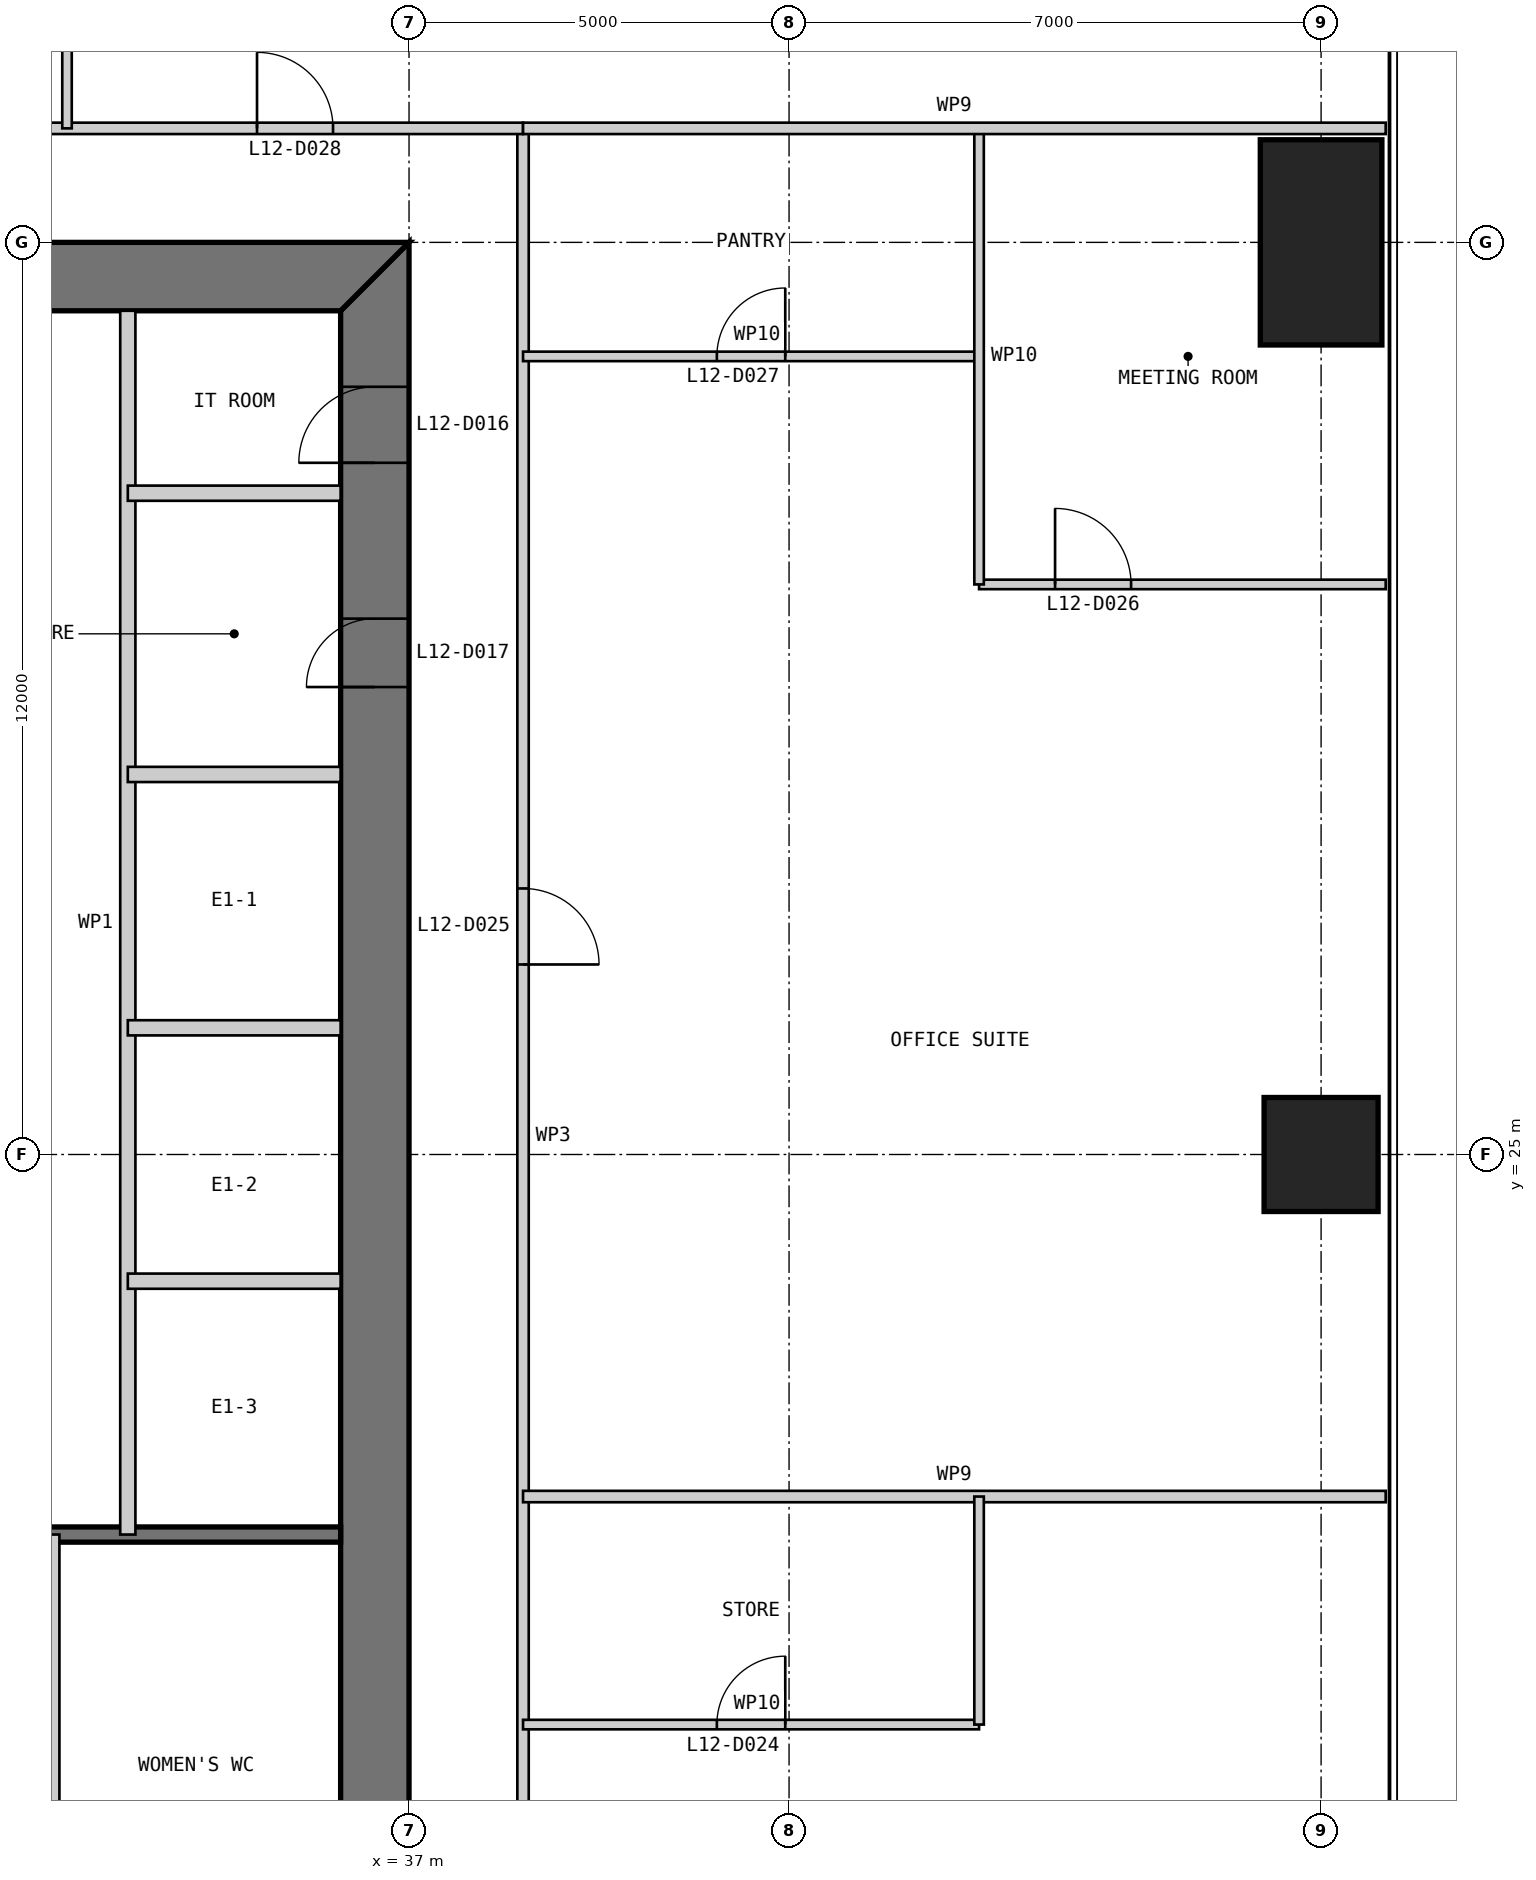
"""IFC4 building model, lengths in metres.
Left out: names, types, materials, properties, quantities, classifications, styles, units other than length and angle.
Written with IfcOpenShell. Run it as: python <this file> out.ifc"""

import sys

from ifc_helpers import new_model, si_unit, direction, frame, frame_2d, origin, origin_2d, place, context, subcontext, project, spatial, polyline, rectangle, outline, extrude, element, fill, save


model = new_model("IFC4")
c1 = context("Model", 3, precision=1e-05, world=origin(), true_north=direction((0.0, 1.0)))
c2 = subcontext(c1, "Body", "Model", "MODEL_VIEW")
j1 = project(units=[si_unit("LENGTHUNIT", "METRE"), si_unit("PLANEANGLEUNIT", "RADIAN")], contexts=[c1])
p1 = place(None, origin())
s1 = spatial("IfcSite", under=j1, at=p1, CompositionType="ELEMENT")
p2 = place(p1, origin())
s2 = spatial("IfcBuilding", under=s1, at=p2, CompositionType="ELEMENT")
p3 = place(p2, frame((0.0, 0.0, 55.0)))
s3 = spatial("IfcBuildingStorey", under=s2, at=p3, CompositionType="ELEMENT", Elevation=55.0)
p4 = place(p3, frame((49.0, 25.0, 0.0), z_axis=(0.0, 0.0, 1.0), x_axis=(1.0, 0.0, 0.0)))
e1 = element("IfcColumn", 1, at=p4, inside=s3, PredefinedType="COLUMN", context=c2, shape_type="SweptSolid", body=[
    extrude(rectangle(XDim=1.5, YDim=1.5, at=origin_2d()), origin(), (0.0, 0.0, 1.0), 4.0),
])
p5 = place(p3, frame((49.0, 37.0, 0.0), z_axis=(0.0, 0.0, 1.0), x_axis=(1.0, 0.0, 0.0)))
e2 = element("IfcColumn", 2, at=p5, inside=s3, PredefinedType="COLUMN", context=c2, shape_type="SweptSolid", body=[
    extrude(rectangle(XDim=1.6, YDim=2.7, at=origin_2d()), origin(), (0.0, 0.0, 1.0), 4.0),
])
p6 = place(p3, frame((36.55, 13.9, 0.0), z_axis=(0.0, 0.0, 1.0), x_axis=(0.0, 1.0, 0.0)))
e3 = element("IfcWall", 3, at=p6, inside=s3, PredefinedType="SHEAR", context=c2, shape_type="SweptSolid", body=[
    extrude(outline(polyline([(-0.9, -0.45), (23.1, -0.45), (22.2, 0.45), (0.0, 0.45), (-0.9, -0.45)])), origin(), (0.0, 0.0, 1.0), 4.0),
])
p7 = place(p6, frame((20.2, 0.0, 0.0)))
e4 = element("IfcOpeningElement", 4, at=p7, cuts=e3, PredefinedType="OPENING", context=c2, shape_type="SweptSolid", body=[
    extrude(rectangle(XDim=1.0, YDim=2.2, at=frame_2d((0.5, 1.1))), frame((0.0, 0.46, 0.0), z_axis=(0.0, -1.0, 0.0), x_axis=(1.0, 0.0, 0.0)), (0.0, 0.0, 1.0), 0.92),
])
p8 = place(p6, frame((17.25, 0.0, 0.0)))
e5 = element("IfcOpeningElement", 5, at=p8, cuts=e3, PredefinedType="OPENING", context=c2, shape_type="SweptSolid", body=[
    extrude(rectangle(XDim=0.9, YDim=2.2, at=frame_2d((0.45, 1.1))), frame((0.0, 0.46, 0.0), z_axis=(0.0, -1.0, 0.0), x_axis=(1.0, 0.0, 0.0)), (0.0, 0.0, 1.0), 0.92),
])
p9 = place(p3, frame((37.0, 36.55, 0.0), z_axis=(0.0, 0.0, 1.0), x_axis=(-1.0, 0.0, 0.0)))
e6 = element("IfcWall", 6, at=p9, inside=s3, PredefinedType="SHEAR", context=c2, shape_type="SweptSolid", body=[
    extrude(outline(polyline([(0.0, -0.45), (24.0, -0.45), (23.1, 0.45), (0.9, 0.45), (0.0, -0.45)])), origin(), (0.0, 0.0, 1.0), 4.0),
])
p10 = place(p9, frame((4.9, 0.0, 0.0)))
e7 = element("IfcOpeningElement", 7, at=p10, cuts=e6, PredefinedType="OPENING", context=c2, shape_type="SweptSolid", body=[
    extrude(rectangle(XDim=1.0, YDim=2.2, at=frame_2d((0.5, 1.1))), frame((0.0, 0.46, 0.0), z_axis=(0.0, -1.0, 0.0), x_axis=(1.0, 0.0, 0.0)), (0.0, 0.0, 1.0), 0.92),
])
p11 = place(p9, frame((8.9, 0.0, 0.0)))
e8 = element("IfcOpeningElement", 8, at=p11, cuts=e6, PredefinedType="OPENING", context=c2, shape_type="SweptSolid", body=[
    extrude(rectangle(XDim=1.1, YDim=2.2, at=frame_2d((0.55, 1.1))), frame((0.0, 0.46, 0.0), z_axis=(0.0, -1.0, 0.0), x_axis=(1.0, 0.0, 0.0)), (0.0, 0.0, 1.0), 0.92),
])
p12 = place(p9, frame((15.05, 0.0, 0.0)))
e9 = element("IfcOpeningElement", 9, at=p12, cuts=e6, PredefinedType="OPENING", context=c2, shape_type="SweptSolid", body=[
    extrude(rectangle(XDim=0.9, YDim=2.2, at=frame_2d((0.45, 1.1))), frame((0.0, 0.46, 0.0), z_axis=(0.0, -1.0, 0.0), x_axis=(1.0, 0.0, 0.0)), (0.0, 0.0, 1.0), 0.92),
])
p13 = place(p9, frame((17.9, 0.0, 0.0)))
e10 = element("IfcOpeningElement", 10, at=p13, cuts=e6, PredefinedType="OPENING", context=c2, shape_type="SweptSolid", body=[
    extrude(rectangle(XDim=1.0, YDim=2.2, at=frame_2d((0.5, 1.1))), frame((0.0, 0.46, 0.0), z_axis=(0.0, -1.0, 0.0), x_axis=(1.0, 0.0, 0.0)), (0.0, 0.0, 1.0), 0.92),
])
p14 = place(p9, frame((21.4, 0.0, 0.0)))
e11 = element("IfcOpeningElement", 11, at=p14, cuts=e6, PredefinedType="OPENING", context=c2, shape_type="SweptSolid", body=[
    extrude(rectangle(XDim=1.0, YDim=2.2, at=frame_2d((0.5, 1.1))), frame((0.0, 0.46, 0.0), z_axis=(0.0, -1.0, 0.0), x_axis=(1.0, 0.0, 0.0)), (0.0, 0.0, 1.0), 0.92),
])
p15 = place(p3, frame((20.3, 20.0, 0.0), z_axis=(0.0, 0.0, 1.0), x_axis=(1.0, 0.0, 0.0)))
e12 = element("IfcWall", 12, at=p15, inside=s3, PredefinedType="SOLIDWALL", context=c2, shape_type="SweptSolid", body=[
    extrude(rectangle(XDim=15.8, YDim=0.2, at=frame_2d((7.9, 0.0))), origin(), (0.0, 0.0, 1.0), 3.8),
])
p16 = place(p3, frame((32.3, 13.9, 0.0), z_axis=(0.0, 0.0, 1.0), x_axis=(0.0, 1.0, 0.0)))
e13 = element("IfcWall", 13, at=p16, inside=s3, PredefinedType="PARTITIONING", context=c2, shape_type="SweptSolid", body=[
    extrude(rectangle(XDim=6.1, YDim=0.2, at=frame_2d((3.05, 0.0))), origin(), (0.0, 0.0, 1.0), 3.8),
])
p17 = place(p3, frame((33.3, 36.1, 0.0), z_axis=(0.0, 0.0, 1.0), x_axis=(0.0, -1.0, 0.0)))
e14 = element("IfcWall", 14, at=p17, inside=s3, PredefinedType="PARTITIONING", context=c2, shape_type="SweptSolid", body=[
    extrude(rectangle(XDim=16.1, YDim=0.2, at=frame_2d((8.05, 0.0))), origin(), (0.0, 0.0, 1.0), 3.8),
])
for number, where, z_axis, x_axis in (
    (15, (36.1, 30.0, 0.0), (0.0, 0.0, 1.0), (-1.0, 0.0, 0.0)),
    (16, (36.1, 26.667, 0.0), (0.0, 0.0, 1.0), (-1.0, 0.0, 0.0)),
    (17, (36.1, 23.333, 0.0), (0.0, 0.0, 1.0), (-1.0, 0.0, 0.0)),
    (18, (36.1, 33.7, 0.0), (0.0, 0.0, 1.0), (-1.0, 0.0, 0.0)),
):
    element("IfcWall", number, at=place(p3, frame(where, z_axis=z_axis, x_axis=x_axis)), inside=s3, PredefinedType="PARTITIONING", context=c2, shape_type="SweptSolid", body=[
        extrude(rectangle(XDim=2.8, YDim=0.2, at=frame_2d((1.4, 0.0))), origin(), (0.0, 0.0, 1.0), 3.8),
    ])
p18 = place(p3, frame((38.5, 11.5, 0.0), z_axis=(0.0, 0.0, 1.0), x_axis=(0.0, 1.0, 0.0)))
e19 = element("IfcWall", 19, at=p18, inside=s3, PredefinedType="PARTITIONING", context=c2, shape_type="SweptSolid", body=[
    extrude(rectangle(XDim=27.0, YDim=0.15, at=frame_2d((13.5, 0.0))), origin(), (0.0, 0.0, 1.0), 3.85),
])
p19 = place(p18, frame((2.5, 0.0, 0.0)))
e20 = element("IfcOpeningElement", 20, at=p19, cuts=e19, PredefinedType="OPENING", context=c2, shape_type="SweptSolid", body=[
    extrude(rectangle(XDim=1.0, YDim=2.2, at=frame_2d((0.5, 1.1))), frame((0.0, 0.085, 0.0), z_axis=(0.0, -1.0, 0.0), x_axis=(1.0, 0.0, 0.0)), (0.0, 0.0, 1.0), 0.17),
])
p20 = place(p18, frame((16.0, 0.0, 0.0)))
e21 = element("IfcOpeningElement", 21, at=p20, cuts=e19, PredefinedType="OPENING", context=c2, shape_type="SweptSolid", body=[
    extrude(rectangle(XDim=1.0, YDim=2.2, at=frame_2d((0.5, 1.1))), frame((0.0, 0.085, 0.0), z_axis=(0.0, -1.0, 0.0), x_axis=(1.0, 0.0, 0.0)), (0.0, 0.0, 1.0), 0.17),
])
p21 = place(p3, frame((44.5, 17.5, 0.0), z_axis=(0.0, 0.0, 1.0), x_axis=(-1.0, 0.0, 0.0)))
e22 = element("IfcWall", 22, at=p21, inside=s3, PredefinedType="PARTITIONING", context=c2, shape_type="SweptSolid", body=[
    extrude(rectangle(XDim=6.0, YDim=0.125, at=frame_2d((3.0, 0.0))), origin(), (0.0, 0.0, 1.0), 3.85),
])
p22 = place(p21, frame((2.55, 0.0, 0.0)))
e23 = element("IfcOpeningElement", 23, at=p22, cuts=e22, PredefinedType="OPENING", context=c2, shape_type="SweptSolid", body=[
    extrude(rectangle(XDim=0.9, YDim=2.2, at=frame_2d((0.45, 1.1))), frame((0.0, 0.073, 0.0), z_axis=(0.0, -1.0, 0.0), x_axis=(1.0, 0.0, 0.0)), (0.0, 0.0, 1.0), 0.145),
])
p23 = place(p3, frame((49.85, 20.5, 0.0), z_axis=(0.0, 0.0, 1.0), x_axis=(-1.0, 0.0, 0.0)))
e24 = element("IfcWall", 24, at=p23, inside=s3, PredefinedType="PARTITIONING", context=c2, shape_type="SweptSolid", body=[
    extrude(rectangle(XDim=11.35, YDim=0.15, at=frame_2d((5.675, 0.0))), origin(), (0.0, 0.0, 1.0), 3.85),
])
p24 = place(p3, frame((49.85, 32.5, 0.0), z_axis=(0.0, 0.0, 1.0), x_axis=(-1.0, 0.0, 0.0)))
e25 = element("IfcWall", 25, at=p24, inside=s3, PredefinedType="PARTITIONING", context=c2, shape_type="SweptSolid", body=[
    extrude(rectangle(XDim=5.35, YDim=0.125, at=frame_2d((2.675, 0.0))), origin(), (0.0, 0.0, 1.0), 3.85),
])
p25 = place(p24, frame((3.35, 0.0, 0.0)))
e26 = element("IfcOpeningElement", 26, at=p25, cuts=e25, PredefinedType="OPENING", context=c2, shape_type="SweptSolid", body=[
    extrude(rectangle(XDim=1.0, YDim=2.2, at=frame_2d((0.5, 1.1))), frame((0.0, 0.073, 0.0), z_axis=(0.0, -1.0, 0.0), x_axis=(1.0, 0.0, 0.0)), (0.0, 0.0, 1.0), 0.145),
])
p26 = place(p3, frame((44.5, 35.5, 0.0), z_axis=(0.0, 0.0, 1.0), x_axis=(-1.0, 0.0, 0.0)))
e27 = element("IfcWall", 27, at=p26, inside=s3, PredefinedType="PARTITIONING", context=c2, shape_type="SweptSolid", body=[
    extrude(rectangle(XDim=6.0, YDim=0.125, at=frame_2d((3.0, 0.0))), origin(), (0.0, 0.0, 1.0), 3.85),
])
p27 = place(p26, frame((2.55, 0.0, 0.0)))
e28 = element("IfcOpeningElement", 28, at=p27, cuts=e27, PredefinedType="OPENING", context=c2, shape_type="SweptSolid", body=[
    extrude(rectangle(XDim=0.9, YDim=2.2, at=frame_2d((0.45, 1.1))), frame((0.0, 0.073, 0.0), z_axis=(0.0, -1.0, 0.0), x_axis=(1.0, 0.0, 0.0)), (0.0, 0.0, 1.0), 0.145),
])
p28 = place(p3, frame((44.5, 17.5, 0.0), z_axis=(0.0, 0.0, 1.0), x_axis=(0.0, 1.0, 0.0)))
e29 = element("IfcWall", 29, at=p28, inside=s3, PredefinedType="PARTITIONING", context=c2, shape_type="SweptSolid", body=[
    extrude(rectangle(XDim=3.0, YDim=0.125, at=frame_2d((1.5, 0.0))), origin(), (0.0, 0.0, 1.0), 3.85),
])
p29 = place(p3, frame((44.5, 32.5, 0.0), z_axis=(0.0, 0.0, 1.0), x_axis=(0.0, 1.0, 0.0)))
e30 = element("IfcWall", 30, at=p29, inside=s3, PredefinedType="PARTITIONING", context=c2, shape_type="SweptSolid", body=[
    extrude(rectangle(XDim=6.0, YDim=0.125, at=frame_2d((3.0, 0.0))), origin(), (0.0, 0.0, 1.0), 3.85),
])
p30 = place(p3, frame((38.5, 38.5, 0.0), z_axis=(0.0, 0.0, 1.0), x_axis=(-1.0, 0.0, 0.0)))
e31 = element("IfcWall", 31, at=p30, inside=s3, PredefinedType="PARTITIONING", context=c2, shape_type="SweptSolid", body=[
    extrude(rectangle(XDim=27.0, YDim=0.15, at=frame_2d((13.5, 0.0))), origin(), (0.0, 0.0, 1.0), 3.85),
])
p31 = place(p30, frame((2.5, 0.0, 0.0)))
e32 = element("IfcOpeningElement", 32, at=p31, cuts=e31, PredefinedType="OPENING", context=c2, shape_type="SweptSolid", body=[
    extrude(rectangle(XDim=1.0, YDim=2.2, at=frame_2d((0.5, 1.1))), frame((0.0, 0.085, 0.0), z_axis=(0.0, -1.0, 0.0), x_axis=(1.0, 0.0, 0.0)), (0.0, 0.0, 1.0), 0.17),
])
p32 = place(p30, frame((16.0, 0.0, 0.0)))
e33 = element("IfcOpeningElement", 33, at=p32, cuts=e31, PredefinedType="OPENING", context=c2, shape_type="SweptSolid", body=[
    extrude(rectangle(XDim=1.0, YDim=2.2, at=frame_2d((0.5, 1.1))), frame((0.0, 0.085, 0.0), z_axis=(0.0, -1.0, 0.0), x_axis=(1.0, 0.0, 0.0)), (0.0, 0.0, 1.0), 0.17),
])
p33 = place(p3, frame((49.85, 38.5, 0.0), z_axis=(0.0, 0.0, 1.0), x_axis=(-1.0, 0.0, 0.0)))
e34 = element("IfcWall", 34, at=p33, inside=s3, PredefinedType="PARTITIONING", context=c2, shape_type="SweptSolid", body=[
    extrude(rectangle(XDim=11.35, YDim=0.15, at=frame_2d((5.675, 0.0))), origin(), (0.0, 0.0, 1.0), 3.85),
])
p34 = place(p3, frame((32.5, 44.5, 0.0), z_axis=(0.0, 0.0, 1.0), x_axis=(0.0, -1.0, 0.0)))
e35 = element("IfcWall", 35, at=p34, inside=s3, PredefinedType="PARTITIONING", context=c2, shape_type="SweptSolid", body=[
    extrude(rectangle(XDim=6.0, YDim=0.125, at=frame_2d((3.0, 0.0))), origin(), (0.0, 0.0, 1.0), 3.85),
])
p35 = place(p34, frame((2.55, 0.0, 0.0)))
e36 = element("IfcOpeningElement", 36, at=p35, cuts=e35, PredefinedType="OPENING", context=c2, shape_type="SweptSolid", body=[
    extrude(rectangle(XDim=0.9, YDim=2.2, at=frame_2d((0.45, 1.1))), frame((0.0, 0.073, 0.0), z_axis=(0.0, -1.0, 0.0), x_axis=(1.0, 0.0, 0.0)), (0.0, 0.0, 1.0), 0.145),
])
p36 = place(p7, origin())
e37 = element("IfcDoor", 37, at=p36, inside=s3, OperationType="SINGLE_SWING_LEFT", PredefinedType="DOOR", context=c2, shape_type="SweptSolid", body=[
    extrude(rectangle(XDim=1.0, YDim=2.2, at=frame_2d((0.5, 1.1))), frame((0.0, 0.025, 0.0), z_axis=(0.0, -1.0, 0.0), x_axis=(1.0, 0.0, 0.0)), (0.0, 0.0, 1.0), 0.05),
    extrude(outline(polyline([(0.0, 0.0), (0.04, 0.0), (0.04, 2.16), (0.96, 2.16), (0.96, 0.0), (1.0, 0.0), (1.0, 2.2), (0.0, 2.2), (0.0, 0.0)])), frame((0.0, 0.3, 0.0), z_axis=(0.0, -1.0, 0.0), x_axis=(1.0, 0.0, 0.0)), (0.0, 0.0, 1.0), 0.6),
])
fill(e4, e37)
p37 = place(p8, origin())
e38 = element("IfcDoor", 38, at=p37, inside=s3, OperationType="SINGLE_SWING_LEFT", PredefinedType="DOOR", context=c2, shape_type="SweptSolid", body=[
    extrude(rectangle(XDim=0.9, YDim=2.2, at=frame_2d((0.45, 1.1))), frame((0.0, 0.025, 0.0), z_axis=(0.0, -1.0, 0.0), x_axis=(1.0, 0.0, 0.0)), (0.0, 0.0, 1.0), 0.05),
    extrude(outline(polyline([(0.0, 0.0), (0.04, 0.0), (0.04, 2.16), (0.86, 2.16), (0.86, 0.0), (0.9, 0.0), (0.9, 2.2), (0.0, 2.2), (0.0, 0.0)])), frame((0.0, 0.3, 0.0), z_axis=(0.0, -1.0, 0.0), x_axis=(1.0, 0.0, 0.0)), (0.0, 0.0, 1.0), 0.6),
])
fill(e5, e38)
p38 = place(p22, frame((0.9, 0.0, 0.0), z_axis=(0.0, 0.0, 1.0), x_axis=(-1.0, 0.0, 0.0)))
e39 = element("IfcDoor", 39, at=p38, inside=s3, OperationType="SINGLE_SWING_RIGHT", PredefinedType="DOOR", context=c2, shape_type="SweptSolid", body=[
    extrude(rectangle(XDim=0.9, YDim=2.2, at=frame_2d((0.45, 1.1))), frame((0.0, 0.025, 0.0), z_axis=(0.0, -1.0, 0.0), x_axis=(1.0, 0.0, 0.0)), (0.0, 0.0, 1.0), 0.05),
])
fill(e23, e39)
p39 = place(p20, frame((1.0, 0.0, 0.0), z_axis=(0.0, 0.0, 1.0), x_axis=(-1.0, 0.0, 0.0)))
e40 = element("IfcDoor", 40, at=p39, inside=s3, OperationType="SINGLE_SWING_RIGHT", PredefinedType="DOOR", context=c2, shape_type="SweptSolid", body=[
    extrude(rectangle(XDim=1.0, YDim=2.2, at=frame_2d((0.5, 1.1))), frame((0.0, 0.025, 0.0), z_axis=(0.0, -1.0, 0.0), x_axis=(1.0, 0.0, 0.0)), (0.0, 0.0, 1.0), 0.05),
])
fill(e21, e40)
p40 = place(p25, frame((1.0, 0.0, 0.0), z_axis=(0.0, 0.0, 1.0), x_axis=(-1.0, 0.0, 0.0)))
e41 = element("IfcDoor", 41, at=p40, inside=s3, OperationType="SINGLE_SWING_LEFT", PredefinedType="DOOR", context=c2, shape_type="SweptSolid", body=[
    extrude(rectangle(XDim=1.0, YDim=2.2, at=frame_2d((0.5, 1.1))), frame((0.0, 0.025, 0.0), z_axis=(0.0, -1.0, 0.0), x_axis=(1.0, 0.0, 0.0)), (0.0, 0.0, 1.0), 0.05),
])
fill(e26, e41)
p41 = place(p27, frame((0.9, 0.0, 0.0), z_axis=(0.0, 0.0, 1.0), x_axis=(-1.0, 0.0, 0.0)))
e42 = element("IfcDoor", 42, at=p41, inside=s3, OperationType="SINGLE_SWING_RIGHT", PredefinedType="DOOR", context=c2, shape_type="SweptSolid", body=[
    extrude(rectangle(XDim=0.9, YDim=2.2, at=frame_2d((0.45, 1.1))), frame((0.0, 0.025, 0.0), z_axis=(0.0, -1.0, 0.0), x_axis=(1.0, 0.0, 0.0)), (0.0, 0.0, 1.0), 0.05),
])
fill(e28, e42)
p42 = place(p31, frame((1.0, 0.0, 0.0), z_axis=(0.0, 0.0, 1.0), x_axis=(-1.0, 0.0, 0.0)))
e43 = element("IfcDoor", 43, at=p42, inside=s3, OperationType="SINGLE_SWING_LEFT", PredefinedType="DOOR", context=c2, shape_type="SweptSolid", body=[
    extrude(rectangle(XDim=1.0, YDim=2.2, at=frame_2d((0.5, 1.1))), frame((0.0, 0.025, 0.0), z_axis=(0.0, -1.0, 0.0), x_axis=(1.0, 0.0, 0.0)), (0.0, 0.0, 1.0), 0.05),
])
fill(e32, e43)
save(model, sys.argv[1])
